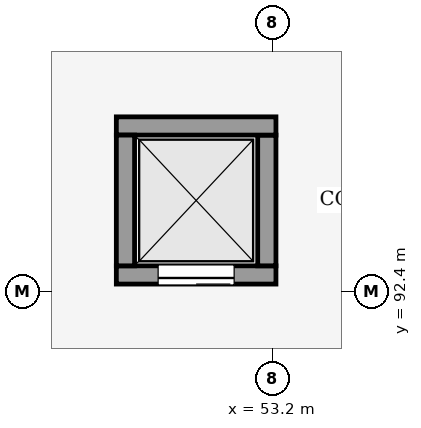
"""IFC4 building model, lengths in metres.
Left out: names, types, materials, properties, quantities, classifications, styles, units other than length and angle.
Written with IfcOpenShell. Run it as: python <this file> out.ifc"""

import sys

from ifc_helpers import new_model, si_unit, direction, frame, frame_2d, origin, place, context, subcontext, project, spatial, rectangle, extrude, element, fill, save


model = new_model("IFC4")
c1 = context("Model", 3, precision=1e-05, world=origin(), true_north=direction((0.0, 1.0)))
c2 = subcontext(c1, "Body", "Model", "MODEL_VIEW")
j1 = project(units=[si_unit("LENGTHUNIT", "METRE"), si_unit("PLANEANGLEUNIT", "RADIAN")], contexts=[c1])
p1 = place(None, origin())
s1 = spatial("IfcSite", under=j1, at=p1, CompositionType="ELEMENT")
p2 = place(p1, origin())
s2 = spatial("IfcBuilding", under=s1, at=p2, CompositionType="ELEMENT")
p3 = place(p2, frame((0.0, 0.0, 17.25)))
s3 = spatial("IfcBuildingStorey", under=s2, at=p3, CompositionType="ELEMENT", Elevation=17.25)
p4 = place(p3, frame((53.25, 92.62, 0.0), z_axis=(0.0, 0.0, 1.0), x_axis=(-1.0, 0.0, 0.0)))
e1 = element("IfcWall", 1, at=p4, inside=s3, PredefinedType="SHEAR", context=c2, shape_type="SweptSolid", body=[
    extrude(rectangle(XDim=2.1, YDim=0.24, at=frame_2d((1.05, 0.0))), origin(), (0.0, 0.0, 1.0), 4.05),
])
p5 = place(p4, frame((0.55, 0.0, 0.0)))
e2 = element("IfcOpeningElement", 2, at=p5, cuts=e1, PredefinedType="OPENING", context=c2, shape_type="SweptSolid", body=[
    extrude(rectangle(XDim=1.0, YDim=2.15, at=frame_2d((0.5, 1.075))), frame((0.0, 0.13, 0.0), z_axis=(0.0, -1.0, 0.0), x_axis=(1.0, 0.0, 0.0)), (0.0, 0.0, 1.0), 0.26),
])
p6 = place(p3, frame((53.13, 94.46, 0.0), z_axis=(0.0, 0.0, 1.0), x_axis=(0.0, -1.0, 0.0)))
e3 = element("IfcWall", 3, at=p6, inside=s3, PredefinedType="SHEAR", context=c2, shape_type="SweptSolid", body=[
    extrude(rectangle(XDim=1.72, YDim=0.24, at=frame_2d((0.86, 0.0))), origin(), (0.0, 0.0, 1.0), 4.05),
])
p7 = place(p3, frame((51.15, 94.58, 0.0), z_axis=(0.0, 0.0, 1.0), x_axis=(1.0, 0.0, 0.0)))
e4 = element("IfcWall", 4, at=p7, inside=s3, PredefinedType="SHEAR", context=c2, shape_type="SweptSolid", body=[
    extrude(rectangle(XDim=2.1, YDim=0.24, at=frame_2d((1.05, 0.0))), origin(), (0.0, 0.0, 1.0), 4.05),
])
p8 = place(p3, frame((51.27, 92.74, 0.0), z_axis=(0.0, 0.0, 1.0), x_axis=(0.0, 1.0, 0.0)))
e5 = element("IfcWall", 5, at=p8, inside=s3, PredefinedType="SHEAR", context=c2, shape_type="SweptSolid", body=[
    extrude(rectangle(XDim=1.72, YDim=0.24, at=frame_2d((0.86, 0.0))), origin(), (0.0, 0.0, 1.0), 4.05),
])
p9 = place(p5, origin())
e6 = element("IfcDoor", 6, at=p9, inside=s3, OperationType="SLIDING_TO_LEFT", PredefinedType="DOOR", context=c2, shape_type="SweptSolid", body=[
    extrude(rectangle(XDim=1.0, YDim=2.15, at=frame_2d((0.5, 1.075))), frame((0.0, 0.025, 0.0), z_axis=(0.0, -1.0, 0.0), x_axis=(1.0, 0.0, 0.0)), (0.0, 0.0, 1.0), 0.05),
])
fill(e2, e6)
save(model, sys.argv[1])
